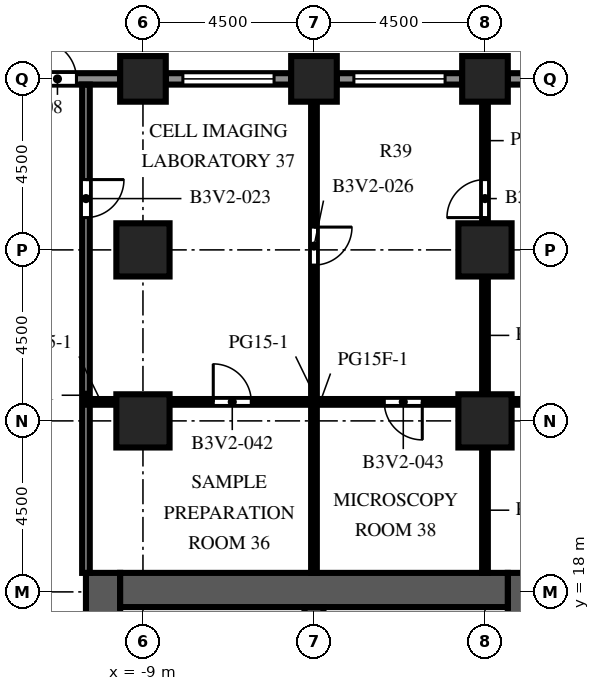
"""IFC4 building model, lengths in metres.
Left out: names, types, materials, properties, quantities, classifications, styles, units other than length and angle.
Written with IfcOpenShell. Run it as: python <this file> out.ifc"""

import sys

from ifc_helpers import new_model, si_unit, direction, frame, frame_2d, origin, origin_2d, place, context, subcontext, project, spatial, rectangle, extrude, element, fill, save


model = new_model("IFC4")
c1 = context("Model", 3, precision=1e-05, world=origin(), true_north=direction((0.0, 1.0)))
c2 = subcontext(c1, "Body", "Model", "MODEL_VIEW")
j1 = project(units=[si_unit("LENGTHUNIT", "METRE"), si_unit("PLANEANGLEUNIT", "RADIAN")], contexts=[c1])
p1 = place(None, origin())
s1 = spatial("IfcSite", under=j1, at=p1, CompositionType="ELEMENT")
p2 = place(p1, origin())
s2 = spatial("IfcBuilding", under=s1, at=p2, CompositionType="ELEMENT")
p3 = place(p2, frame((0.0, 0.0, 98.4)))
s3 = spatial("IfcBuildingStorey", under=s2, at=p3, CompositionType="ELEMENT", Elevation=98.4)
for number, where, z_axis, x_axis in (
    (1, (-9.0, 31.5, 0.0), (0.0, 0.0, 1.0), (1.0, 0.0, 0.0)),
    (2, (-4.5, 31.5, 0.0), (0.0, 0.0, 1.0), (1.0, 0.0, 0.0)),
    (3, (0.0, 31.5, 0.0), (0.0, 0.0, 1.0), (1.0, 0.0, 0.0)),
):
    element("IfcColumn", number, at=place(p3, frame(where, z_axis=z_axis, x_axis=x_axis)), inside=s3, PredefinedType="COLUMN", context=c2, shape_type="SweptSolid", body=[
        extrude(rectangle(XDim=1.2, YDim=1.2, at=origin_2d()), origin(), (0.0, 0.0, 1.0), 4.1),
    ])
for number, where, z_axis, x_axis in (
    (4, (-9.0, 22.5, 0.0), (0.0, 0.0, 1.0), (1.0, 0.0, 0.0)),
    (5, (-9.0, 27.0, 0.0), (0.0, 0.0, 1.0), (1.0, 0.0, 0.0)),
    (6, (0.0, 22.5, 0.0), (0.0, 0.0, 1.0), (1.0, 0.0, 0.0)),
    (7, (0.0, 27.0, 0.0), (0.0, 0.0, 1.0), (1.0, 0.0, 0.0)),
):
    element("IfcColumn", number, at=place(p3, frame(where, z_axis=z_axis, x_axis=x_axis)), inside=s3, PredefinedType="COLUMN", context=c2, shape_type="SweptSolid", body=[
        extrude(rectangle(XDim=1.4, YDim=1.4, at=origin_2d()), origin(), (0.0, 0.0, 1.0), 4.1),
    ])
p4 = place(p3, frame((-10.05, -9.0, 0.0), z_axis=(0.0, 0.0, 1.0), x_axis=(0.0, 1.0, 0.0)))
e8 = element("IfcWall", 8, at=p4, inside=s3, PredefinedType="SHEAR", context=c2, shape_type="SweptSolid", body=[
    extrude(rectangle(XDim=27.5, YDim=0.9, at=frame_2d((13.75, 0.0))), origin(), (0.0, 0.0, 1.0), 4.1),
])
p5 = place(p4, frame((12.55, 0.0, 0.0)))
e9 = element("IfcOpeningElement", 9, at=p5, cuts=e8, PredefinedType="OPENING", context=c2, shape_type="SweptSolid", body=[
    extrude(rectangle(XDim=2.4, YDim=2.4, at=frame_2d((1.2, 1.2))), frame((0.0, 0.46, 0.0), z_axis=(0.0, -1.0, 0.0), x_axis=(1.0, 0.0, 0.0)), (0.0, 0.0, 1.0), 0.92),
])
p6 = place(p4, frame((6.825, 0.0, 0.0)))
e10 = element("IfcOpeningElement", 10, at=p6, cuts=e8, PredefinedType="OPENING", context=c2, shape_type="SweptSolid", body=[
    extrude(rectangle(XDim=1.2, YDim=2.1, at=frame_2d((0.6, 1.05))), frame((0.0, 0.46, 0.0), z_axis=(0.0, -1.0, 0.0), x_axis=(1.0, 0.0, 0.0)), (0.0, 0.0, 1.0), 0.92),
])
p7 = place(p4, frame((19.475, 0.0, 0.0)))
e11 = element("IfcOpeningElement", 11, at=p7, cuts=e8, PredefinedType="OPENING", context=c2, shape_type="SweptSolid", body=[
    extrude(rectangle(XDim=1.2, YDim=2.1, at=frame_2d((0.6, 1.05))), frame((0.0, 0.46, 0.0), z_axis=(0.0, -1.0, 0.0), x_axis=(1.0, 0.0, 0.0)), (0.0, 0.0, 1.0), 0.92),
])
p8 = place(p3, frame((1.05, -9.0, 0.0), z_axis=(0.0, 0.0, 1.0), x_axis=(0.0, 1.0, 0.0)))
e12 = element("IfcWall", 12, at=p8, inside=s3, PredefinedType="SHEAR", context=c2, shape_type="SweptSolid", body=[
    extrude(rectangle(XDim=27.5, YDim=0.9, at=frame_2d((13.75, 0.0))), origin(), (0.0, 0.0, 1.0), 4.1),
])
p9 = place(p8, frame((12.55, 0.0, 0.0)))
e13 = element("IfcOpeningElement", 13, at=p9, cuts=e12, PredefinedType="OPENING", context=c2, shape_type="SweptSolid", body=[
    extrude(rectangle(XDim=2.4, YDim=2.4, at=frame_2d((1.2, 1.2))), frame((0.0, 0.46, 0.0), z_axis=(0.0, -1.0, 0.0), x_axis=(1.0, 0.0, 0.0)), (0.0, 0.0, 1.0), 0.92),
])
p10 = place(p8, frame((3.893, 0.0, 0.0)))
e14 = element("IfcOpeningElement", 14, at=p10, cuts=e12, PredefinedType="OPENING", context=c2, shape_type="SweptSolid", body=[
    extrude(rectangle(XDim=0.923, YDim=2.1, at=frame_2d((0.461, 1.05))), frame((0.0, 0.46, 0.0), z_axis=(0.0, -1.0, 0.0), x_axis=(1.0, 0.0, 0.0)), (0.0, 0.0, 1.0), 0.92),
])
p11 = place(p8, frame((23.427, 0.0, 0.0)))
e15 = element("IfcOpeningElement", 15, at=p11, cuts=e12, PredefinedType="OPENING", context=c2, shape_type="SweptSolid", body=[
    extrude(rectangle(XDim=1.2, YDim=2.1, at=frame_2d((0.6, 1.05))), frame((0.0, 0.46, 0.0), z_axis=(0.0, -1.0, 0.0), x_axis=(1.0, 0.0, 0.0)), (0.0, 0.0, 1.0), 0.92),
])
p12 = place(p3, frame((-9.6, 18.05, 0.0), z_axis=(0.0, 0.0, 1.0), x_axis=(1.0, 0.0, 0.0)))
e16 = element("IfcWall", 16, at=p12, inside=s3, PredefinedType="SHEAR", context=c2, shape_type="SweptSolid", body=[
    extrude(rectangle(XDim=10.2, YDim=0.9, at=frame_2d((5.1, 0.0))), origin(), (0.0, 0.0, 1.0), 4.1),
])
p13 = place(p3, frame((-4.5, 10.25, 0.0), z_axis=(0.0, 0.0, 1.0), x_axis=(0.0, 1.0, 0.0)))
e17 = element("IfcWall", 17, at=p13, inside=s3, PredefinedType="SHEAR", context=c2, shape_type="SweptSolid", body=[
    extrude(rectangle(XDim=7.35, YDim=0.5, at=frame_2d((3.675, 0.0))), origin(), (0.0, 0.0, 1.0), 4.1),
])
p14 = place(p3, frame((0.6, 31.5, 0.0), z_axis=(0.0, 0.0, 1.0), x_axis=(1.0, 0.0, 0.0)))
e18 = element("IfcWall", 18, at=p14, inside=s3, PredefinedType="SOLIDWALL", context=c2, shape_type="SweptSolid", body=[
    extrude(rectangle(XDim=3.3, YDim=0.3, at=frame_2d((1.65, 0.0))), origin(), (0.0, 0.0, 1.0), 2.75),
])
p15 = place(p14, frame((0.45, 0.0, 0.8)))
e19 = element("IfcOpeningElement", 19, at=p15, cuts=e18, PredefinedType="OPENING", context=c2, shape_type="SweptSolid", body=[
    extrude(rectangle(XDim=2.4, YDim=1.7, at=frame_2d((1.2, 0.85))), frame((0.0, 0.16, 0.0), z_axis=(0.0, -1.0, 0.0), x_axis=(1.0, 0.0, 0.0)), (0.0, 0.0, 1.0), 0.32),
])
p16 = place(p3, frame((-3.9, 31.5, 0.0), z_axis=(0.0, 0.0, 1.0), x_axis=(1.0, 0.0, 0.0)))
e20 = element("IfcWall", 20, at=p16, inside=s3, PredefinedType="SOLIDWALL", context=c2, shape_type="SweptSolid", body=[
    extrude(rectangle(XDim=3.3, YDim=0.3, at=frame_2d((1.65, 0.0))), origin(), (0.0, 0.0, 1.0), 2.75),
])
p17 = place(p16, frame((0.45, 0.0, 0.8)))
e21 = element("IfcOpeningElement", 21, at=p17, cuts=e20, PredefinedType="OPENING", context=c2, shape_type="SweptSolid", body=[
    extrude(rectangle(XDim=2.4, YDim=1.7, at=frame_2d((1.2, 0.85))), frame((0.0, 0.16, 0.0), z_axis=(0.0, -1.0, 0.0), x_axis=(1.0, 0.0, 0.0)), (0.0, 0.0, 1.0), 0.32),
])
p18 = place(p3, frame((-8.4, 31.5, 0.0), z_axis=(0.0, 0.0, 1.0), x_axis=(1.0, 0.0, 0.0)))
e22 = element("IfcWall", 22, at=p18, inside=s3, PredefinedType="SOLIDWALL", context=c2, shape_type="SweptSolid", body=[
    extrude(rectangle(XDim=3.3, YDim=0.3, at=frame_2d((1.65, 0.0))), origin(), (0.0, 0.0, 1.0), 2.75),
])
p19 = place(p18, frame((0.45, 0.0, 0.8)))
e23 = element("IfcOpeningElement", 23, at=p19, cuts=e22, PredefinedType="OPENING", context=c2, shape_type="SweptSolid", body=[
    extrude(rectangle(XDim=2.4, YDim=1.7, at=frame_2d((1.2, 0.85))), frame((0.0, 0.16, 0.0), z_axis=(0.0, -1.0, 0.0), x_axis=(1.0, 0.0, 0.0)), (0.0, 0.0, 1.0), 0.32),
])
p20 = place(p3, frame((-12.9, 31.5, 0.0), z_axis=(0.0, 0.0, 1.0), x_axis=(1.0, 0.0, 0.0)))
e24 = element("IfcWall", 24, at=p20, inside=s3, PredefinedType="SOLIDWALL", context=c2, shape_type="SweptSolid", body=[
    extrude(rectangle(XDim=3.3, YDim=0.3, at=frame_2d((1.65, 0.0))), origin(), (0.0, 0.0, 1.0), 2.75),
])
p21 = place(p20, frame((1.15, 0.0, 0.0)))
e25 = element("IfcOpeningElement", 25, at=p21, cuts=e24, PredefinedType="OPENING", context=c2, shape_type="SweptSolid", body=[
    extrude(rectangle(XDim=1.0, YDim=2.2, at=frame_2d((0.5, 1.1))), frame((0.0, 0.16, 0.0), z_axis=(0.0, -1.0, 0.0), x_axis=(1.0, 0.0, 0.0)), (0.0, 0.0, 1.0), 0.32),
])
p22 = place(p3, frame((-0.7, 15.028, 0.0), z_axis=(0.0, 0.0, 1.0), x_axis=(0.0, 1.0, 0.0)))
e26 = element("IfcWall", 26, at=p22, inside=s3, PredefinedType="PARTITIONING", context=c2, shape_type="SweptSolid", body=[
    extrude(rectangle(XDim=2.573, YDim=0.1, at=frame_2d((1.286, 0.0))), origin(), (0.0, 0.0, 1.0), 3.65),
])
p23 = place(p22, frame((0.786, 0.0, 0.0)))
e27 = element("IfcOpeningElement", 27, at=p23, cuts=e26, PredefinedType="OPENING", context=c2, shape_type="SweptSolid", body=[
    extrude(rectangle(XDim=1.0, YDim=2.1, at=frame_2d((0.5, 1.05))), frame((0.0, 0.06, 0.0), z_axis=(0.0, -1.0, 0.0), x_axis=(1.0, 0.0, 0.0)), (0.0, 0.0, 1.0), 0.12),
])
p24 = place(p3, frame((-10.5, 31.35, 0.0), z_axis=(0.0, 0.0, 1.0), x_axis=(0.0, -1.0, 0.0)))
e28 = element("IfcWall", 28, at=p24, inside=s3, PredefinedType="PARTITIONING", context=c2, shape_type="SweptSolid", body=[
    extrude(rectangle(XDim=12.85, YDim=0.2, at=frame_2d((6.425, 0.0))), origin(), (0.0, 0.0, 1.0), 3.65),
])
p25 = place(p24, frame((2.5, 0.0, 0.0)))
e29 = element("IfcOpeningElement", 29, at=p25, cuts=e28, PredefinedType="OPENING", context=c2, shape_type="SweptSolid", body=[
    extrude(rectangle(XDim=1.0, YDim=2.1, at=frame_2d((0.5, 1.05))), frame((0.0, 0.11, 0.0), z_axis=(0.0, -1.0, 0.0), x_axis=(1.0, 0.0, 0.0)), (0.0, 0.0, 1.0), 0.22),
])
p26 = place(p3, frame((-4.5, 30.9, 0.0), z_axis=(0.0, 0.0, 1.0), x_axis=(0.0, -1.0, 0.0)))
e30 = element("IfcWall", 30, at=p26, inside=s3, PredefinedType="PARTITIONING", context=c2, shape_type="SweptSolid", body=[
    extrude(rectangle(XDim=12.4, YDim=0.15, at=frame_2d((6.2, 0.0))), origin(), (0.0, 0.0, 1.0), 3.65),
])
p27 = place(p26, frame((3.3, 0.0, 0.0)))
e31 = element("IfcOpeningElement", 31, at=p27, cuts=e30, PredefinedType="OPENING", context=c2, shape_type="SweptSolid", body=[
    extrude(rectangle(XDim=1.0, YDim=2.1, at=frame_2d((0.5, 1.05))), frame((0.0, 0.085, 0.0), z_axis=(0.0, -1.0, 0.0), x_axis=(1.0, 0.0, 0.0)), (0.0, 0.0, 1.0), 0.17),
])
p28 = place(p3, frame((0.0, 18.5, 0.0), z_axis=(0.0, 0.0, 1.0), x_axis=(0.0, 1.0, 0.0)))
e32 = element("IfcWall", 32, at=p28, inside=s3, PredefinedType="PARTITIONING", context=c2, shape_type="SweptSolid", body=[
    extrude(rectangle(XDim=3.3, YDim=0.15, at=frame_2d((1.65, 0.0))), origin(), (0.0, 0.0, 1.0), 3.65),
])
p29 = place(p3, frame((0.0, 23.2, 0.0), z_axis=(0.0, 0.0, 1.0), x_axis=(0.0, 1.0, 0.0)))
e33 = element("IfcWall", 33, at=p29, inside=s3, PredefinedType="PARTITIONING", context=c2, shape_type="SweptSolid", body=[
    extrude(rectangle(XDim=3.1, YDim=0.15, at=frame_2d((1.55, 0.0))), origin(), (0.0, 0.0, 1.0), 3.65),
])
p30 = place(p3, frame((0.0, 30.9, 0.0), z_axis=(0.0, 0.0, 1.0), x_axis=(0.0, -1.0, 0.0)))
e34 = element("IfcWall", 34, at=p30, inside=s3, PredefinedType="PARTITIONING", context=c2, shape_type="SweptSolid", body=[
    extrude(rectangle(XDim=3.2, YDim=0.15, at=frame_2d((1.6, 0.0))), origin(), (0.0, 0.0, 1.0), 3.65),
])
p31 = place(p30, frame((2.05, 0.0, 0.0)))
e35 = element("IfcOpeningElement", 35, at=p31, cuts=e34, PredefinedType="OPENING", context=c2, shape_type="SweptSolid", body=[
    extrude(rectangle(XDim=1.0, YDim=2.1, at=frame_2d((0.5, 1.05))), frame((0.0, 0.085, 0.0), z_axis=(0.0, -1.0, 0.0), x_axis=(1.0, 0.0, 0.0)), (0.0, 0.0, 1.0), 0.17),
])
p32 = place(p3, frame((-10.5, 23.0, 0.0), z_axis=(0.0, 0.0, 1.0), x_axis=(1.0, 0.0, 0.0)))
e36 = element("IfcWall", 36, at=p32, inside=s3, PredefinedType="PARTITIONING", context=c2, shape_type="SweptSolid", body=[
    extrude(rectangle(XDim=0.8, YDim=0.15, at=frame_2d((0.4, 0.0))), origin(), (0.0, 0.0, 1.0), 3.65),
])
p33 = place(p3, frame((-0.7, 23.0, 0.0), z_axis=(0.0, 0.0, 1.0), x_axis=(-1.0, 0.0, 0.0)))
e37 = element("IfcWall", 37, at=p33, inside=s3, PredefinedType="PARTITIONING", context=c2, shape_type="SweptSolid", body=[
    extrude(rectangle(XDim=7.6, YDim=0.15, at=frame_2d((3.8, 0.0))), origin(), (0.0, 0.0, 1.0), 3.65),
])
p34 = place(p33, frame((5.45, 0.0, 0.0)))
e38 = element("IfcOpeningElement", 38, at=p34, cuts=e37, PredefinedType="OPENING", context=c2, shape_type="SweptSolid", body=[
    extrude(rectangle(XDim=1.0, YDim=2.1, at=frame_2d((0.5, 1.05))), frame((0.0, 0.085, 0.0), z_axis=(0.0, -1.0, 0.0), x_axis=(1.0, 0.0, 0.0)), (0.0, 0.0, 1.0), 0.17),
])
p35 = place(p33, frame((0.95, 0.0, 0.0)))
e39 = element("IfcOpeningElement", 39, at=p35, cuts=e37, PredefinedType="OPENING", context=c2, shape_type="SweptSolid", body=[
    extrude(rectangle(XDim=1.0, YDim=2.1, at=frame_2d((0.5, 1.05))), frame((0.0, 0.085, 0.0), z_axis=(0.0, -1.0, 0.0), x_axis=(1.0, 0.0, 0.0)), (0.0, 0.0, 1.0), 0.17),
])
p36 = place(p3, frame((8.3, 23.0, 0.0), z_axis=(0.0, 0.0, 1.0), x_axis=(-1.0, 0.0, 0.0)))
e40 = element("IfcWall", 40, at=p36, inside=s3, PredefinedType="PARTITIONING", context=c2, shape_type="SweptSolid", body=[
    extrude(rectangle(XDim=7.6, YDim=0.15, at=frame_2d((3.8, 0.0))), origin(), (0.0, 0.0, 1.0), 3.65),
])
p37 = place(p36, frame((3.95, 0.0, 0.0)))
e41 = element("IfcOpeningElement", 41, at=p37, cuts=e40, PredefinedType="OPENING", context=c2, shape_type="SweptSolid", body=[
    extrude(rectangle(XDim=1.0, YDim=2.1, at=frame_2d((0.5, 1.05))), frame((0.0, 0.085, 0.0), z_axis=(0.0, -1.0, 0.0), x_axis=(1.0, 0.0, 0.0)), (0.0, 0.0, 1.0), 0.17),
])
p38 = place(p17, origin())
e42 = element("IfcWindow", 42, at=p38, inside=s3, PartitioningType="SINGLE_PANEL", PredefinedType="WINDOW", context=c2, shape_type="SweptSolid", body=[
    extrude(rectangle(XDim=2.4, YDim=1.7, at=frame_2d((1.2, 0.85))), frame((0.0, 0.03, 0.0), z_axis=(0.0, -1.0, 0.0), x_axis=(1.0, 0.0, 0.0)), (0.0, 0.0, 1.0), 0.06),
])
fill(e21, e42)
p39 = place(p19, origin())
e43 = element("IfcWindow", 43, at=p39, inside=s3, PartitioningType="SINGLE_PANEL", PredefinedType="WINDOW", context=c2, shape_type="SweptSolid", body=[
    extrude(rectangle(XDim=2.4, YDim=1.7, at=frame_2d((1.2, 0.85))), frame((0.0, 0.03, 0.0), z_axis=(0.0, -1.0, 0.0), x_axis=(1.0, 0.0, 0.0)), (0.0, 0.0, 1.0), 0.06),
])
fill(e23, e43)
p40 = place(p21, origin())
e44 = element("IfcDoor", 44, at=p40, inside=s3, OperationType="SINGLE_SWING_LEFT", PredefinedType="DOOR", context=c2, shape_type="SweptSolid", body=[
    extrude(rectangle(XDim=1.0, YDim=2.2, at=frame_2d((0.5, 1.1))), frame((0.0, 0.025, 0.0), z_axis=(0.0, -1.0, 0.0), x_axis=(1.0, 0.0, 0.0)), (0.0, 0.0, 1.0), 0.05),
])
fill(e25, e44)
p41 = place(p25, origin())
e45 = element("IfcDoor", 45, at=p41, inside=s3, OperationType="SINGLE_SWING_LEFT", PredefinedType="DOOR", context=c2, shape_type="SweptSolid", body=[
    extrude(rectangle(XDim=1.0, YDim=2.1, at=frame_2d((0.5, 1.05))), frame((0.0, 0.025, 0.0), z_axis=(0.0, -1.0, 0.0), x_axis=(1.0, 0.0, 0.0)), (0.0, 0.0, 1.0), 0.05),
])
fill(e29, e45)
p42 = place(p27, origin())
e46 = element("IfcDoor", 46, at=p42, inside=s3, OperationType="SINGLE_SWING_LEFT", PredefinedType="DOOR", context=c2, shape_type="SweptSolid", body=[
    extrude(rectangle(XDim=1.0, YDim=2.1, at=frame_2d((0.5, 1.05))), frame((0.0, 0.025, 0.0), z_axis=(0.0, -1.0, 0.0), x_axis=(1.0, 0.0, 0.0)), (0.0, 0.0, 1.0), 0.05),
])
fill(e31, e46)
p43 = place(p31, origin())
e47 = element("IfcDoor", 47, at=p43, inside=s3, OperationType="SINGLE_SWING_RIGHT", PredefinedType="DOOR", context=c2, shape_type="SweptSolid", body=[
    extrude(rectangle(XDim=1.0, YDim=2.1, at=frame_2d((0.5, 1.05))), frame((0.0, 0.025, 0.0), z_axis=(0.0, -1.0, 0.0), x_axis=(1.0, 0.0, 0.0)), (0.0, 0.0, 1.0), 0.05),
])
fill(e35, e47)
p44 = place(p34, origin())
e48 = element("IfcDoor", 48, at=p44, inside=s3, OperationType="SINGLE_SWING_RIGHT", PredefinedType="DOOR", context=c2, shape_type="SweptSolid", body=[
    extrude(rectangle(XDim=1.0, YDim=2.1, at=frame_2d((0.5, 1.05))), frame((0.0, 0.025, 0.0), z_axis=(0.0, -1.0, 0.0), x_axis=(1.0, 0.0, 0.0)), (0.0, 0.0, 1.0), 0.05),
])
fill(e38, e48)
p45 = place(p35, origin())
e49 = element("IfcDoor", 49, at=p45, inside=s3, OperationType="SINGLE_SWING_LEFT", PredefinedType="DOOR", context=c2, shape_type="SweptSolid", body=[
    extrude(rectangle(XDim=1.0, YDim=2.1, at=frame_2d((0.5, 1.05))), frame((0.0, 0.025, 0.0), z_axis=(0.0, -1.0, 0.0), x_axis=(1.0, 0.0, 0.0)), (0.0, 0.0, 1.0), 0.05),
])
fill(e39, e49)
save(model, sys.argv[1])
